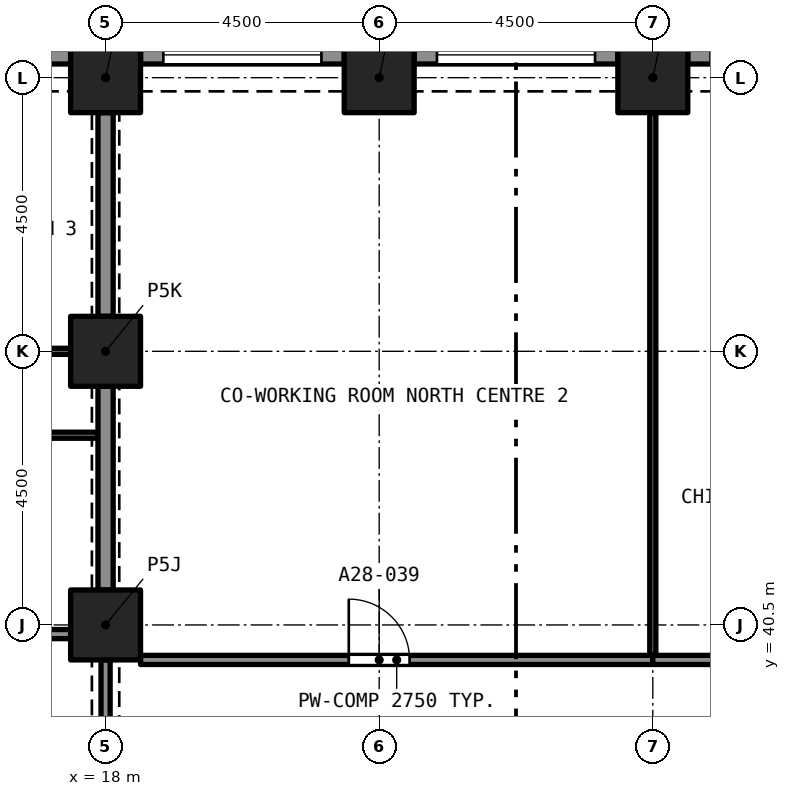
"""IFC4 building model, lengths in metres.
Left out: names, types, materials, properties, quantities, classifications, styles, units other than length and angle.
Written with IfcOpenShell. Run it as: python <this file> out.ifc"""

import sys

from ifc_helpers import new_model, si_unit, direction, frame, frame_2d, origin, origin_2d, place, context, subcontext, project, spatial, rectangle, extrude, element, fill, save


model = new_model("IFC4")
c1 = context("Model", 3, precision=1e-05, world=origin(), true_north=direction((0.0, 1.0)))
c2 = subcontext(c1, "Body", "Model", "MODEL_VIEW")
j1 = project(units=[si_unit("LENGTHUNIT", "METRE"), si_unit("PLANEANGLEUNIT", "RADIAN")], contexts=[c1])
p1 = place(None, origin())
s1 = spatial("IfcSite", under=j1, at=p1, CompositionType="ELEMENT")
p2 = place(p1, origin())
s2 = spatial("IfcBuilding", under=s1, at=p2, CompositionType="ELEMENT")
p3 = place(p2, frame((0.0, 0.0, 102.4)))
s3 = spatial("IfcBuildingStorey", under=s2, at=p3, CompositionType="ELEMENT", Elevation=102.4)
for number, where, z_axis, x_axis in (
    (1, (18.0, 40.5, 0.0), (0.0, 0.0, 1.0), (1.0, 0.0, 0.0)),
    (2, (18.0, 45.0, 0.0), (0.0, 0.0, 1.0), (1.0, 0.0, 0.0)),
    (3, (18.0, 49.5, 0.0), (0.0, 0.0, 1.0), (1.0, 0.0, 0.0)),
    (4, (22.5, 49.5, 0.0), (0.0, 0.0, 1.0), (1.0, 0.0, 0.0)),
    (5, (27.0, 49.5, 0.0), (0.0, 0.0, 1.0), (1.0, 0.0, 0.0)),
):
    element("IfcColumn", number, at=place(p3, frame(where, z_axis=z_axis, x_axis=x_axis)), inside=s3, PredefinedType="COLUMN", context=c2, shape_type="SweptSolid", body=[
        extrude(rectangle(XDim=1.15, YDim=1.15, at=origin_2d()), origin(), (0.0, 0.0, 1.0), 3.2),
    ])
p4 = place(p3, frame((27.575, 49.875, 0.0), z_axis=(0.0, 0.0, 1.0), x_axis=(1.0, 0.0, 0.0)))
e6 = element("IfcWall", 6, at=p4, inside=s3, PredefinedType="SOLIDWALL", context=c2, shape_type="SweptSolid", body=[
    extrude(rectangle(XDim=3.35, YDim=0.3, at=frame_2d((1.675, 0.0))), origin(), (0.0, 0.0, 1.0), 3.2),
])
p5 = place(p4, frame((0.375, 0.0, 0.45)))
e7 = element("IfcOpeningElement", 7, at=p5, cuts=e6, PredefinedType="OPENING", context=c2, shape_type="SweptSolid", body=[
    extrude(rectangle(XDim=2.6, YDim=1.95, at=frame_2d((1.3, 0.975))), frame((0.0, 0.16, 0.0), z_axis=(0.0, -1.0, 0.0), x_axis=(1.0, 0.0, 0.0)), (0.0, 0.0, 1.0), 0.32),
])
p6 = place(p3, frame((23.075, 49.875, 0.0), z_axis=(0.0, 0.0, 1.0), x_axis=(1.0, 0.0, 0.0)))
e8 = element("IfcWall", 8, at=p6, inside=s3, PredefinedType="SOLIDWALL", context=c2, shape_type="SweptSolid", body=[
    extrude(rectangle(XDim=3.35, YDim=0.3, at=frame_2d((1.675, 0.0))), origin(), (0.0, 0.0, 1.0), 3.2),
])
p7 = place(p6, frame((0.375, 0.0, 0.45)))
e9 = element("IfcOpeningElement", 9, at=p7, cuts=e8, PredefinedType="OPENING", context=c2, shape_type="SweptSolid", body=[
    extrude(rectangle(XDim=2.6, YDim=1.95, at=frame_2d((1.3, 0.975))), frame((0.0, 0.16, 0.0), z_axis=(0.0, -1.0, 0.0), x_axis=(1.0, 0.0, 0.0)), (0.0, 0.0, 1.0), 0.32),
])
p8 = place(p3, frame((18.575, 49.875, 0.0), z_axis=(0.0, 0.0, 1.0), x_axis=(1.0, 0.0, 0.0)))
e10 = element("IfcWall", 10, at=p8, inside=s3, PredefinedType="SOLIDWALL", context=c2, shape_type="SweptSolid", body=[
    extrude(rectangle(XDim=3.35, YDim=0.3, at=frame_2d((1.675, 0.0))), origin(), (0.0, 0.0, 1.0), 3.2),
])
p9 = place(p8, frame((0.375, 0.0, 0.45)))
e11 = element("IfcOpeningElement", 11, at=p9, cuts=e10, PredefinedType="OPENING", context=c2, shape_type="SweptSolid", body=[
    extrude(rectangle(XDim=2.6, YDim=1.95, at=frame_2d((1.3, 0.975))), frame((0.0, 0.16, 0.0), z_axis=(0.0, -1.0, 0.0), x_axis=(1.0, 0.0, 0.0)), (0.0, 0.0, 1.0), 0.32),
])
p10 = place(p3, frame((14.075, 49.875, 0.0), z_axis=(0.0, 0.0, 1.0), x_axis=(1.0, 0.0, 0.0)))
e12 = element("IfcWall", 12, at=p10, inside=s3, PredefinedType="SOLIDWALL", context=c2, shape_type="SweptSolid", body=[
    extrude(rectangle(XDim=3.35, YDim=0.3, at=frame_2d((1.675, 0.0))), origin(), (0.0, 0.0, 1.0), 3.2),
])
p11 = place(p10, frame((0.375, 0.0, 0.45)))
e13 = element("IfcOpeningElement", 13, at=p11, cuts=e12, PredefinedType="OPENING", context=c2, shape_type="SweptSolid", body=[
    extrude(rectangle(XDim=2.6, YDim=1.95, at=frame_2d((1.3, 0.975))), frame((0.0, 0.16, 0.0), z_axis=(0.0, -1.0, 0.0), x_axis=(1.0, 0.0, 0.0)), (0.0, 0.0, 1.0), 0.32),
])
p12 = place(p3, frame((13.5, 45.0, 0.0), z_axis=(0.0, 0.0, 1.0), x_axis=(1.0, 0.0, 0.0)))
e14 = element("IfcWall", 14, at=p12, inside=s3, PredefinedType="PARTITIONING", context=c2, shape_type="SweptSolid", body=[
    extrude(rectangle(XDim=3.925, YDim=0.1, at=frame_2d((1.962, 0.0))), origin(), (0.0, 0.0, 1.0), 2.9),
])
p13 = place(p12, frame((1.8, 0.0, 0.0)))
e15 = element("IfcOpeningElement", 15, at=p13, cuts=e14, PredefinedType="OPENING", context=c2, shape_type="SweptSolid", body=[
    extrude(rectangle(XDim=0.9, YDim=2.1, at=frame_2d((0.45, 1.05))), frame((0.0, 0.06, 0.0), z_axis=(0.0, -1.0, 0.0), x_axis=(1.0, 0.0, 0.0)), (0.0, 0.0, 1.0), 0.12),
])
p14 = place(p3, frame((18.0, 45.575, 0.0), z_axis=(0.0, 0.0, 1.0), x_axis=(0.0, 1.0, 0.0)))
e16 = element("IfcWall", 16, at=p14, inside=s3, PredefinedType="PARTITIONING", context=c2, shape_type="SweptSolid", body=[
    extrude(rectangle(XDim=3.35, YDim=0.25, at=frame_2d((1.675, 0.0))), origin(), (0.0, 0.0, 1.0), 2.38),
])
p15 = place(p3, frame((17.875, 43.62, 0.0), z_axis=(0.0, 0.0, 1.0), x_axis=(-1.0, 0.0, 0.0)))
e17 = element("IfcWall", 17, at=p15, inside=s3, PredefinedType="PARTITIONING", context=c2, shape_type="SweptSolid", body=[
    extrude(rectangle(XDim=6.23, YDim=0.1, at=frame_2d((3.115, 0.0))), origin(), (0.0, 0.0, 1.0), 2.9),
])
p16 = place(p15, frame((2.602, 0.0, 0.0)))
e18 = element("IfcOpeningElement", 18, at=p16, cuts=e17, PredefinedType="OPENING", context=c2, shape_type="SweptSolid", body=[
    extrude(rectangle(XDim=0.9, YDim=2.1, at=frame_2d((0.45, 1.05))), frame((0.0, 0.06, 0.0), z_axis=(0.0, -1.0, 0.0), x_axis=(1.0, 0.0, 0.0)), (0.0, 0.0, 1.0), 0.12),
])
p17 = place(p3, frame((18.0, 41.075, 0.0), z_axis=(0.0, 0.0, 1.0), x_axis=(0.0, 1.0, 0.0)))
e19 = element("IfcWall", 19, at=p17, inside=s3, PredefinedType="PARTITIONING", context=c2, shape_type="SweptSolid", body=[
    extrude(rectangle(XDim=3.35, YDim=0.25, at=frame_2d((1.675, 0.0))), origin(), (0.0, 0.0, 1.0), 2.38),
])
p18 = place(p3, frame((13.35, 40.35, 0.0), z_axis=(0.0, 0.0, 1.0), x_axis=(1.0, 0.0, 0.0)))
e20 = element("IfcWall", 20, at=p18, inside=s3, PredefinedType="PARTITIONING", context=c2, shape_type="SweptSolid", body=[
    extrude(rectangle(XDim=4.075, YDim=0.15, at=frame_2d((2.038, 0.0))), origin(), (0.0, 0.0, 1.0), 2.9),
])
p19 = place(p3, frame((18.575, 39.925, 0.0), z_axis=(0.0, 0.0, 1.0), x_axis=(1.0, 0.0, 0.0)))
e21 = element("IfcWall", 21, at=p19, inside=s3, PredefinedType="PARTITIONING", context=c2, shape_type="SweptSolid", body=[
    extrude(rectangle(XDim=8.425, YDim=0.15, at=frame_2d((4.212, 0.0))), origin(), (0.0, 0.0, 1.0), 2.75),
])
p20 = place(p19, frame((3.425, 0.0, 0.0)))
e22 = element("IfcOpeningElement", 22, at=p20, cuts=e21, PredefinedType="OPENING", context=c2, shape_type="SweptSolid", body=[
    extrude(rectangle(XDim=1.0, YDim=2.1, at=frame_2d((0.5, 1.05))), frame((0.0, 0.085, 0.0), z_axis=(0.0, -1.0, 0.0), x_axis=(1.0, 0.0, 0.0)), (0.0, 0.0, 1.0), 0.17),
])
p21 = place(p3, frame((27.0, 39.925, 0.0), z_axis=(0.0, 0.0, 1.0), x_axis=(1.0, 0.0, 0.0)))
e23 = element("IfcWall", 23, at=p21, inside=s3, PredefinedType="PARTITIONING", context=c2, shape_type="SweptSolid", body=[
    extrude(rectangle(XDim=3.925, YDim=0.15, at=frame_2d((1.962, 0.0))), origin(), (0.0, 0.0, 1.0), 2.75),
])
p22 = place(p21, frame((1.75, 0.0, 0.0)))
e24 = element("IfcOpeningElement", 24, at=p22, cuts=e23, PredefinedType="OPENING", context=c2, shape_type="SweptSolid", body=[
    extrude(rectangle(XDim=1.0, YDim=2.1, at=frame_2d((0.5, 1.05))), frame((0.0, 0.085, 0.0), z_axis=(0.0, -1.0, 0.0), x_axis=(1.0, 0.0, 0.0)), (0.0, 0.0, 1.0), 0.17),
])
p23 = place(p3, frame((18.0, 39.925, 0.0), z_axis=(0.0, 0.0, 1.0), x_axis=(0.0, -1.0, 0.0)))
e25 = element("IfcWall", 25, at=p23, inside=s3, PredefinedType="PARTITIONING", context=c2, shape_type="SweptSolid", body=[
    extrude(rectangle(XDim=3.35, YDim=0.15, at=frame_2d((1.675, 0.0))), origin(), (0.0, 0.0, 1.0), 2.38),
])
p24 = place(p23, frame((1.075, 0.0, 0.0)))
e26 = element("IfcOpeningElement", 26, at=p24, cuts=e25, PredefinedType="OPENING", context=c2, shape_type="SweptSolid", body=[
    extrude(rectangle(XDim=1.2, YDim=2.1, at=frame_2d((0.6, 1.05))), frame((0.0, 0.085, 0.0), z_axis=(0.0, -1.0, 0.0), x_axis=(1.0, 0.0, 0.0)), (0.0, 0.0, 1.0), 0.17),
])
p25 = place(p3, frame((27.0, 40.0, 0.0), z_axis=(0.0, 0.0, 1.0), x_axis=(0.0, 1.0, 0.0)))
e27 = element("IfcWall", 27, at=p25, inside=s3, PredefinedType="PARTITIONING", context=c2, shape_type="SweptSolid", body=[
    extrude(rectangle(XDim=8.925, YDim=0.1, at=frame_2d((4.462, 0.0))), origin(), (0.0, 0.0, 1.0), 2.75),
])
p26 = place(p7, origin())
e28 = element("IfcWindow", 28, at=p26, inside=s3, PartitioningType="SINGLE_PANEL", PredefinedType="WINDOW", context=c2, shape_type="SweptSolid", body=[
    extrude(rectangle(XDim=2.6, YDim=1.95, at=frame_2d((1.3, 0.975))), frame((0.0, 0.03, 0.0), z_axis=(0.0, -1.0, 0.0), x_axis=(1.0, 0.0, 0.0)), (0.0, 0.0, 1.0), 0.06),
])
fill(e9, e28)
p27 = place(p9, origin())
e29 = element("IfcWindow", 29, at=p27, inside=s3, PartitioningType="SINGLE_PANEL", PredefinedType="WINDOW", context=c2, shape_type="SweptSolid", body=[
    extrude(rectangle(XDim=2.6, YDim=1.95, at=frame_2d((1.3, 0.975))), frame((0.0, 0.03, 0.0), z_axis=(0.0, -1.0, 0.0), x_axis=(1.0, 0.0, 0.0)), (0.0, 0.0, 1.0), 0.06),
])
fill(e11, e29)
p28 = place(p20, origin())
e30 = element("IfcDoor", 30, at=p28, inside=s3, OperationType="SINGLE_SWING_LEFT", PredefinedType="DOOR", context=c2, shape_type="SweptSolid", body=[
    extrude(rectangle(XDim=1.0, YDim=2.1, at=frame_2d((0.5, 1.05))), frame((0.0, 0.025, 0.0), z_axis=(0.0, -1.0, 0.0), x_axis=(1.0, 0.0, 0.0)), (0.0, 0.0, 1.0), 0.05),
])
fill(e22, e30)
save(model, sys.argv[1])
